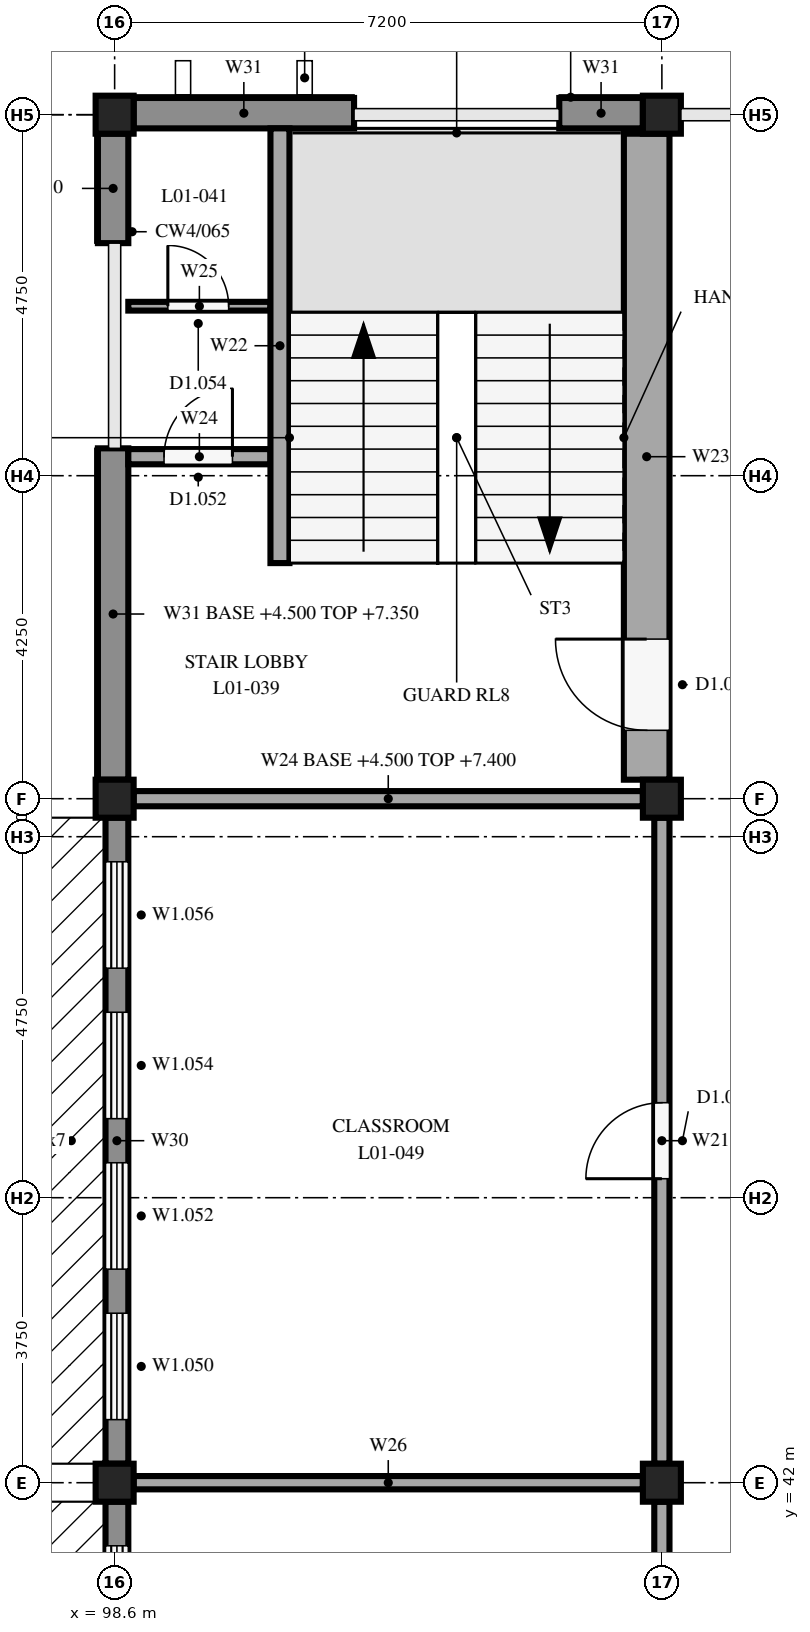
"""IFC4 building model, lengths in metres.
Left out: names, types, materials, properties, quantities, classifications, styles, units other than length and angle.
Written with IfcOpenShell. Run it as: python <this file> out.ifc"""

import sys

from ifc_helpers import new_model, si_unit, direction, frame, frame_2d, origin, origin_2d, place, context, subcontext, project, spatial, rectangle, extrude, element, fill, save


model = new_model("IFC4")
c1 = context("Model", 3, precision=1e-05, world=origin(), true_north=direction((0.0, 1.0)))
c2 = subcontext(c1, "Body", "Model", "MODEL_VIEW")
j1 = project(units=[si_unit("LENGTHUNIT", "METRE"), si_unit("PLANEANGLEUNIT", "RADIAN")], contexts=[c1])
p1 = place(None, origin())
s1 = spatial("IfcSite", under=j1, at=p1, CompositionType="ELEMENT")
p2 = place(p1, origin())
s2 = spatial("IfcBuilding", under=s1, at=p2, CompositionType="ELEMENT")
p3 = place(p2, frame((0.0, 0.0, 4.5)))
s3 = spatial("IfcBuildingStorey", under=s2, at=p3, CompositionType="ELEMENT", Elevation=4.5)
for number, where, z_axis, x_axis in (
    (1, (98.6, 42.0, 0.0), (0.0, 0.0, 1.0), (1.0, 0.0, 0.0)),
    (2, (98.6, 51.0, 0.0), (0.0, 0.0, 1.0), (1.0, 0.0, 0.0)),
    (3, (98.6, 60.0, 0.0), (0.0, 0.0, 1.0), (1.0, 0.0, 0.0)),
    (4, (105.8, 42.0, 0.0), (0.0, 0.0, 1.0), (1.0, 0.0, 0.0)),
    (5, (105.8, 51.0, 0.0), (0.0, 0.0, 1.0), (1.0, 0.0, 0.0)),
    (6, (105.8, 60.0, 0.0), (0.0, 0.0, 1.0), (1.0, 0.0, 0.0)),
):
    element("IfcColumn", number, at=place(p3, frame(where, z_axis=z_axis, x_axis=x_axis)), inside=s3, PredefinedType="COLUMN", context=c2, shape_type="SweptSolid", body=[
        extrude(rectangle(XDim=0.5, YDim=0.5, at=origin_2d()), origin(), (0.0, 0.0, 1.0), 3.35),
    ])
p4 = place(p3, frame((98.63, 33.25, 0.0), z_axis=(0.0, 0.0, 1.0), x_axis=(0.0, 1.0, 0.0)))
e7 = element("IfcWall", 7, at=p4, inside=s3, PredefinedType="STANDARD", context=c2, shape_type="SweptSolid", body=[
    extrude(rectangle(XDim=8.5, YDim=0.3, at=frame_2d((4.25, 0.0))), origin(), (0.0, 0.0, 1.0), 2.85),
])
p5 = place(p4, frame((0.58, 0.0, 0.6)))
e8 = element("IfcOpeningElement", 8, at=p5, cuts=e7, PredefinedType="OPENING", context=c2, shape_type="SweptSolid", body=[
    extrude(rectangle(XDim=1.4, YDim=2.2, at=frame_2d((0.7, 1.1))), frame((0.0, 0.16, 0.0), z_axis=(0.0, -1.0, 0.0), x_axis=(1.0, 0.0, 0.0)), (0.0, 0.0, 1.0), 0.32),
])
p6 = place(p4, frame((2.56, 0.0, 0.6)))
e9 = element("IfcOpeningElement", 9, at=p6, cuts=e7, PredefinedType="OPENING", context=c2, shape_type="SweptSolid", body=[
    extrude(rectangle(XDim=1.4, YDim=2.2, at=frame_2d((0.7, 1.1))), frame((0.0, 0.16, 0.0), z_axis=(0.0, -1.0, 0.0), x_axis=(1.0, 0.0, 0.0)), (0.0, 0.0, 1.0), 0.32),
])
p7 = place(p4, frame((4.54, 0.0, 0.6)))
e10 = element("IfcOpeningElement", 10, at=p7, cuts=e7, PredefinedType="OPENING", context=c2, shape_type="SweptSolid", body=[
    extrude(rectangle(XDim=1.4, YDim=2.2, at=frame_2d((0.7, 1.1))), frame((0.0, 0.16, 0.0), z_axis=(0.0, -1.0, 0.0), x_axis=(1.0, 0.0, 0.0)), (0.0, 0.0, 1.0), 0.32),
])
p8 = place(p4, frame((6.52, 0.0, 0.6)))
e11 = element("IfcOpeningElement", 11, at=p8, cuts=e7, PredefinedType="OPENING", context=c2, shape_type="SweptSolid", body=[
    extrude(rectangle(XDim=1.4, YDim=2.2, at=frame_2d((0.7, 1.1))), frame((0.0, 0.16, 0.0), z_axis=(0.0, -1.0, 0.0), x_axis=(1.0, 0.0, 0.0)), (0.0, 0.0, 1.0), 0.32),
])
p9 = place(p3, frame((98.63, 42.25, 0.0), z_axis=(0.0, 0.0, 1.0), x_axis=(0.0, 1.0, 0.0)))
e12 = element("IfcWall", 12, at=p9, inside=s3, PredefinedType="STANDARD", context=c2, shape_type="SweptSolid", body=[
    extrude(rectangle(XDim=8.5, YDim=0.3, at=frame_2d((4.25, 0.0))), origin(), (0.0, 0.0, 1.0), 2.85),
])
p10 = place(p9, frame((0.58, 0.0, 0.6)))
e13 = element("IfcOpeningElement", 13, at=p10, cuts=e12, PredefinedType="OPENING", context=c2, shape_type="SweptSolid", body=[
    extrude(rectangle(XDim=1.4, YDim=2.2, at=frame_2d((0.7, 1.1))), frame((0.0, 0.16, 0.0), z_axis=(0.0, -1.0, 0.0), x_axis=(1.0, 0.0, 0.0)), (0.0, 0.0, 1.0), 0.32),
])
p11 = place(p9, frame((2.56, 0.0, 0.6)))
e14 = element("IfcOpeningElement", 14, at=p11, cuts=e12, PredefinedType="OPENING", context=c2, shape_type="SweptSolid", body=[
    extrude(rectangle(XDim=1.4, YDim=2.2, at=frame_2d((0.7, 1.1))), frame((0.0, 0.16, 0.0), z_axis=(0.0, -1.0, 0.0), x_axis=(1.0, 0.0, 0.0)), (0.0, 0.0, 1.0), 0.32),
])
p12 = place(p9, frame((4.54, 0.0, 0.6)))
e15 = element("IfcOpeningElement", 15, at=p12, cuts=e12, PredefinedType="OPENING", context=c2, shape_type="SweptSolid", body=[
    extrude(rectangle(XDim=1.4, YDim=2.2, at=frame_2d((0.7, 1.1))), frame((0.0, 0.16, 0.0), z_axis=(0.0, -1.0, 0.0), x_axis=(1.0, 0.0, 0.0)), (0.0, 0.0, 1.0), 0.32),
])
p13 = place(p9, frame((6.52, 0.0, 0.6)))
e16 = element("IfcOpeningElement", 16, at=p13, cuts=e12, PredefinedType="OPENING", context=c2, shape_type="SweptSolid", body=[
    extrude(rectangle(XDim=1.4, YDim=2.2, at=frame_2d((0.7, 1.1))), frame((0.0, 0.16, 0.0), z_axis=(0.0, -1.0, 0.0), x_axis=(1.0, 0.0, 0.0)), (0.0, 0.0, 1.0), 0.32),
])
p14 = place(p3, frame((98.58, 51.25, 0.0), z_axis=(0.0, 0.0, 1.0), x_axis=(0.0, 1.0, 0.0)))
e17 = element("IfcWall", 17, at=p14, inside=s3, PredefinedType="STANDARD", context=c2, shape_type="SweptSolid", body=[
    extrude(rectangle(XDim=4.36, YDim=0.4, at=frame_2d((2.18, 0.0))), origin(), (0.0, 0.0, 1.0), 2.85),
])
p15 = place(p3, frame((98.58, 58.31, 0.0), z_axis=(0.0, 0.0, 1.0), x_axis=(0.0, 1.0, 0.0)))
e18 = element("IfcWall", 18, at=p15, inside=s3, PredefinedType="STANDARD", context=c2, shape_type="SweptSolid", body=[
    extrude(rectangle(XDim=1.44, YDim=0.4, at=frame_2d((0.72, 0.0))), origin(), (0.0, 0.0, 1.0), 2.85),
])
p16 = place(p3, frame((98.85, 60.02, 0.0), z_axis=(0.0, 0.0, 1.0), x_axis=(1.0, 0.0, 0.0)))
e19 = element("IfcWall", 19, at=p16, inside=s3, PredefinedType="STANDARD", context=c2, shape_type="SweptSolid", body=[
    extrude(rectangle(XDim=2.9, YDim=0.4, at=frame_2d((1.45, 0.0))), origin(), (0.0, 0.0, 1.0), 2.9),
])
p17 = place(p3, frame((104.45, 60.02, 0.0), z_axis=(0.0, 0.0, 1.0), x_axis=(1.0, 0.0, 0.0)))
e20 = element("IfcWall", 20, at=p17, inside=s3, PredefinedType="STANDARD", context=c2, shape_type="SweptSolid", body=[
    extrude(rectangle(XDim=1.1, YDim=0.4, at=frame_2d((0.55, 0.0))), origin(), (0.0, 0.0, 1.0), 2.9),
])
p18 = place(p3, frame((100.775, 54.1, 0.0), z_axis=(0.0, 0.0, 1.0), x_axis=(0.0, 1.0, 0.0)))
e21 = element("IfcWall", 21, at=p18, inside=s3, PredefinedType="SOLIDWALL", context=c2, shape_type="SweptSolid", body=[
    extrude(rectangle(XDim=5.72, YDim=0.25, at=frame_2d((2.86, 0.0))), origin(), (0.0, 0.0, 1.0), 3.35),
])
p19 = place(p3, frame((105.6, 51.25, 0.0), z_axis=(0.0, 0.0, 1.0), x_axis=(0.0, 1.0, 0.0)))
e22 = element("IfcWall", 22, at=p19, inside=s3, PredefinedType="SOLIDWALL", context=c2, shape_type="SweptSolid", body=[
    extrude(rectangle(XDim=8.5, YDim=0.6, at=frame_2d((4.25, 0.0))), origin(), (0.0, 0.0, 1.0), 3.35),
])
p20 = place(p19, frame((0.65, 0.0, 0.0)))
e23 = element("IfcOpeningElement", 23, at=p20, cuts=e22, PredefinedType="OPENING", context=c2, shape_type="SweptSolid", body=[
    extrude(rectangle(XDim=1.2, YDim=2.1, at=frame_2d((0.6, 1.05))), frame((0.0, 0.31, 0.0), z_axis=(0.0, -1.0, 0.0), x_axis=(1.0, 0.0, 0.0)), (0.0, 0.0, 1.0), 0.62),
])
p21 = place(p3, frame((98.78, 55.5, 0.0), z_axis=(0.0, 0.0, 1.0), x_axis=(1.0, 0.0, 0.0)))
e24 = element("IfcWall", 24, at=p21, inside=s3, PredefinedType="SOLIDWALL", context=c2, shape_type="SweptSolid", body=[
    extrude(rectangle(XDim=1.87, YDim=0.2, at=frame_2d((0.935, 0.0))), origin(), (0.0, 0.0, 1.0), 3.35),
])
p22 = place(p21, frame((0.47, 0.0, 0.0)))
e25 = element("IfcOpeningElement", 25, at=p22, cuts=e24, PredefinedType="OPENING", context=c2, shape_type="SweptSolid", body=[
    extrude(rectangle(XDim=0.9, YDim=2.1, at=frame_2d((0.45, 1.05))), frame((0.0, 0.11, 0.0), z_axis=(0.0, -1.0, 0.0), x_axis=(1.0, 0.0, 0.0)), (0.0, 0.0, 1.0), 0.22),
])
p23 = place(p3, frame((98.78, 57.48, 0.0), z_axis=(0.0, 0.0, 1.0), x_axis=(1.0, 0.0, 0.0)))
e26 = element("IfcWall", 26, at=p23, inside=s3, PredefinedType="PARTITIONING", context=c2, shape_type="SweptSolid", body=[
    extrude(rectangle(XDim=1.87, YDim=0.115, at=frame_2d((0.935, 0.0))), origin(), (0.0, 0.0, 1.0), 3.35),
])
p24 = place(p23, frame((0.52, 0.0, 0.0)))
e27 = element("IfcOpeningElement", 27, at=p24, cuts=e26, PredefinedType="OPENING", context=c2, shape_type="SweptSolid", body=[
    extrude(rectangle(XDim=0.8, YDim=2.1, at=frame_2d((0.4, 1.05))), frame((0.0, 0.067, 0.0), z_axis=(0.0, -1.0, 0.0), x_axis=(1.0, 0.0, 0.0)), (0.0, 0.0, 1.0), 0.135),
])
p25 = place(p3, frame((98.85, 51.0, 0.0), z_axis=(0.0, 0.0, 1.0), x_axis=(1.0, 0.0, 0.0)))
e28 = element("IfcWall", 28, at=p25, inside=s3, PredefinedType="SOLIDWALL", context=c2, shape_type="SweptSolid", body=[
    extrude(rectangle(XDim=6.7, YDim=0.2, at=frame_2d((3.35, 0.0))), origin(), (0.0, 0.0, 1.0), 2.9),
])
p26 = place(p3, frame((105.8, 33.25, 0.0), z_axis=(0.0, 0.0, 1.0), x_axis=(0.0, 1.0, 0.0)))
e29 = element("IfcWall", 29, at=p26, inside=s3, PredefinedType="PARTITIONING", context=c2, shape_type="SweptSolid", body=[
    extrude(rectangle(XDim=8.5, YDim=0.2, at=frame_2d((4.25, 0.0))), origin(), (0.0, 0.0, 1.0), 2.9),
])
p27 = place(p26, frame((3.75, 0.0, 0.0)))
e30 = element("IfcOpeningElement", 30, at=p27, cuts=e29, PredefinedType="OPENING", context=c2, shape_type="SweptSolid", body=[
    extrude(rectangle(XDim=1.0, YDim=2.1, at=frame_2d((0.5, 1.05))), frame((0.0, 0.11, 0.0), z_axis=(0.0, -1.0, 0.0), x_axis=(1.0, 0.0, 0.0)), (0.0, 0.0, 1.0), 0.22),
])
p28 = place(p3, frame((105.8, 42.25, 0.0), z_axis=(0.0, 0.0, 1.0), x_axis=(0.0, 1.0, 0.0)))
e31 = element("IfcWall", 31, at=p28, inside=s3, PredefinedType="PARTITIONING", context=c2, shape_type="SweptSolid", body=[
    extrude(rectangle(XDim=8.5, YDim=0.2, at=frame_2d((4.25, 0.0))), origin(), (0.0, 0.0, 1.0), 2.9),
])
p29 = place(p28, frame((3.75, 0.0, 0.0)))
e32 = element("IfcOpeningElement", 32, at=p29, cuts=e31, PredefinedType="OPENING", context=c2, shape_type="SweptSolid", body=[
    extrude(rectangle(XDim=1.0, YDim=2.1, at=frame_2d((0.5, 1.05))), frame((0.0, 0.11, 0.0), z_axis=(0.0, -1.0, 0.0), x_axis=(1.0, 0.0, 0.0)), (0.0, 0.0, 1.0), 0.22),
])
p30 = place(p3, frame((98.85, 42.0, 0.0), z_axis=(0.0, 0.0, 1.0), x_axis=(1.0, 0.0, 0.0)))
e33 = element("IfcWall", 33, at=p30, inside=s3, PredefinedType="PARTITIONING", context=c2, shape_type="SweptSolid", body=[
    extrude(rectangle(XDim=6.7, YDim=0.175, at=frame_2d((3.35, 0.0))), origin(), (0.0, 0.0, 1.0), 2.9),
])
p31 = place(p8, origin())
e34 = element("IfcWindow", 34, at=p31, inside=s3, PartitioningType="DOUBLE_PANEL_VERTICAL", PredefinedType="WINDOW", context=c2, shape_type="SweptSolid", body=[
    extrude(rectangle(XDim=1.4, YDim=2.2, at=frame_2d((0.7, 1.1))), frame((0.0, 0.03, 0.0), z_axis=(0.0, -1.0, 0.0), x_axis=(1.0, 0.0, 0.0)), (0.0, 0.0, 1.0), 0.06),
])
fill(e11, e34)
p32 = place(p10, origin())
e35 = element("IfcWindow", 35, at=p32, inside=s3, PartitioningType="DOUBLE_PANEL_VERTICAL", PredefinedType="WINDOW", context=c2, shape_type="SweptSolid", body=[
    extrude(rectangle(XDim=1.4, YDim=2.2, at=frame_2d((0.7, 1.1))), frame((0.0, 0.03, 0.0), z_axis=(0.0, -1.0, 0.0), x_axis=(1.0, 0.0, 0.0)), (0.0, 0.0, 1.0), 0.06),
])
fill(e13, e35)
p33 = place(p11, origin())
e36 = element("IfcWindow", 36, at=p33, inside=s3, PartitioningType="DOUBLE_PANEL_VERTICAL", PredefinedType="WINDOW", context=c2, shape_type="SweptSolid", body=[
    extrude(rectangle(XDim=1.4, YDim=2.2, at=frame_2d((0.7, 1.1))), frame((0.0, 0.03, 0.0), z_axis=(0.0, -1.0, 0.0), x_axis=(1.0, 0.0, 0.0)), (0.0, 0.0, 1.0), 0.06),
])
fill(e14, e36)
p34 = place(p12, origin())
e37 = element("IfcWindow", 37, at=p34, inside=s3, PartitioningType="DOUBLE_PANEL_VERTICAL", PredefinedType="WINDOW", context=c2, shape_type="SweptSolid", body=[
    extrude(rectangle(XDim=1.4, YDim=2.2, at=frame_2d((0.7, 1.1))), frame((0.0, 0.03, 0.0), z_axis=(0.0, -1.0, 0.0), x_axis=(1.0, 0.0, 0.0)), (0.0, 0.0, 1.0), 0.06),
])
fill(e15, e37)
p35 = place(p13, origin())
e38 = element("IfcWindow", 38, at=p35, inside=s3, PartitioningType="DOUBLE_PANEL_VERTICAL", PredefinedType="WINDOW", context=c2, shape_type="SweptSolid", body=[
    extrude(rectangle(XDim=1.4, YDim=2.2, at=frame_2d((0.7, 1.1))), frame((0.0, 0.03, 0.0), z_axis=(0.0, -1.0, 0.0), x_axis=(1.0, 0.0, 0.0)), (0.0, 0.0, 1.0), 0.06),
])
fill(e16, e38)
p36 = place(p20, origin())
e39 = element("IfcDoor", 39, at=p36, inside=s3, OperationType="SINGLE_SWING_RIGHT", PredefinedType="DOOR", context=c2, shape_type="SweptSolid", body=[
    extrude(rectangle(XDim=1.2, YDim=2.1, at=frame_2d((0.6, 1.05))), frame((0.0, 0.025, 0.0), z_axis=(0.0, -1.0, 0.0), x_axis=(1.0, 0.0, 0.0)), (0.0, 0.0, 1.0), 0.05),
])
fill(e23, e39)
p37 = place(p22, origin())
e40 = element("IfcDoor", 40, at=p37, inside=s3, OperationType="SINGLE_SWING_RIGHT", PredefinedType="DOOR", context=c2, shape_type="SweptSolid", body=[
    extrude(rectangle(XDim=0.9, YDim=2.1, at=frame_2d((0.45, 1.05))), frame((0.0, 0.025, 0.0), z_axis=(0.0, -1.0, 0.0), x_axis=(1.0, 0.0, 0.0)), (0.0, 0.0, 1.0), 0.05),
])
fill(e25, e40)
p38 = place(p24, origin())
e41 = element("IfcDoor", 41, at=p38, inside=s3, OperationType="SINGLE_SWING_LEFT", PredefinedType="DOOR", context=c2, shape_type="SweptSolid", body=[
    extrude(rectangle(XDim=0.8, YDim=2.1, at=frame_2d((0.4, 1.05))), frame((0.0, 0.025, 0.0), z_axis=(0.0, -1.0, 0.0), x_axis=(1.0, 0.0, 0.0)), (0.0, 0.0, 1.0), 0.05),
])
fill(e27, e41)
p39 = place(p29, origin())
e42 = element("IfcDoor", 42, at=p39, inside=s3, OperationType="SINGLE_SWING_LEFT", PredefinedType="DOOR", context=c2, shape_type="SweptSolid", body=[
    extrude(rectangle(XDim=1.0, YDim=2.1, at=frame_2d((0.5, 1.05))), frame((0.0, 0.025, 0.0), z_axis=(0.0, -1.0, 0.0), x_axis=(1.0, 0.0, 0.0)), (0.0, 0.0, 1.0), 0.05),
])
fill(e32, e42)
save(model, sys.argv[1])
